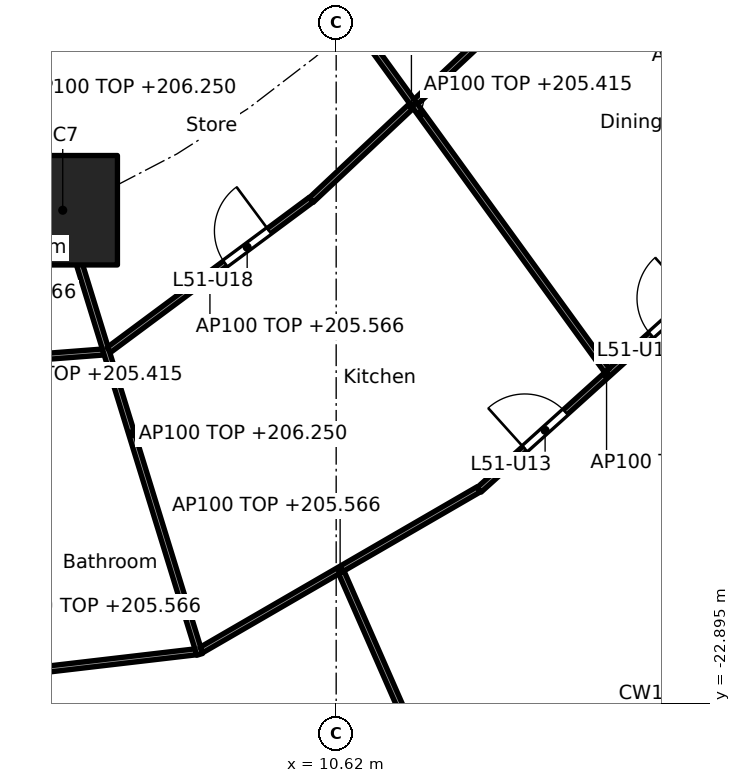
"""IFC4 building model, lengths in metres.
Left out: names, types, materials, properties, quantities, classifications, styles, units other than length and angle.
Written with IfcOpenShell. Run it as: python <this file> out.ifc"""

import sys

from ifc_helpers import new_model, si_unit, direction, frame, frame_2d, origin, origin_2d, place, context, subcontext, project, spatial, rectangle, extrude, element, fill, save


model = new_model("IFC4")
c1 = context("Model", 3, precision=1e-05, world=origin(), true_north=direction((0.0, 1.0)))
c2 = subcontext(c1, "Body", "Model", "MODEL_VIEW")
j1 = project(units=[si_unit("LENGTHUNIT", "METRE"), si_unit("PLANEANGLEUNIT", "RADIAN")], contexts=[c1])
p1 = place(None, origin())
s1 = spatial("IfcSite", under=j1, at=p1, CompositionType="ELEMENT")
p2 = place(p1, origin())
s2 = spatial("IfcBuilding", under=s1, at=p2, CompositionType="ELEMENT")
p3 = place(p2, frame((0.0, 0.0, 202.9)))
s3 = spatial("IfcBuildingStorey", under=s2, at=p3, CompositionType="ELEMENT", Elevation=202.9)
p4 = place(p3, frame((6.123, -14.782, 0.0), z_axis=(0.0, 0.0, 1.0), x_axis=(1.0, 0.0, 0.0)))
e1 = element("IfcColumn", 1, at=p4, inside=s3, PredefinedType="COLUMN", context=c2, shape_type="SweptSolid", body=[
    extrude(rectangle(XDim=1.8, YDim=1.8, at=origin_2d()), origin(), (0.0, 0.0, 1.0), 3.7),
])
p5 = place(p3, frame((5.275, -12.494, 0.0), z_axis=(0.0, 0.0, 1.0), x_axis=(0.707106781187, 0.707106781187, 0.0)))
e2 = element("IfcWall", 2, at=p5, inside=s3, PredefinedType="PARTITIONING", context=c2, shape_type="SweptSolid", body=[
    extrude(rectangle(XDim=10.409, YDim=0.2, at=frame_2d((5.205, 0.0))), origin(), (0.0, 0.0, 1.0), 3.35),
])
p6 = place(p3, frame((2.941, -22.671, 0.0), z_axis=(0.0, 0.0, 1.0), x_axis=(0.993245806382, 0.1160291692, 0.0)))
e3 = element("IfcWall", 3, at=p6, inside=s3, PredefinedType="PARTITIONING", context=c2, shape_type="SweptSolid", body=[
    extrude(rectangle(XDim=5.408, YDim=0.1, at=frame_2d((2.704, 0.0))), origin(), (0.0, 0.0, 1.0), 2.666),
])
p7 = place(p6, frame((0.902, 0.0, 0.0)))
e4 = element("IfcOpeningElement", 4, at=p7, cuts=e3, PredefinedType="OPENING", context=c2, shape_type="SweptSolid", body=[
    extrude(rectangle(XDim=0.9, YDim=2.1, at=frame_2d((0.45, 1.05))), frame((0.0, 0.06, 0.0), z_axis=(0.0, -1.0, 0.0), x_axis=(1.0, 0.0, 0.0)), (0.0, 0.0, 1.0), 0.12),
])
p8 = place(p3, frame((4.568, -17.284, 0.0), z_axis=(0.0, 0.0, 1.0), x_axis=(0.997076339393, 0.076411867029, 0.0)))
e5 = element("IfcWall", 5, at=p8, inside=s3, PredefinedType="PARTITIONING", context=c2, shape_type="SweptSolid", body=[
    extrude(rectangle(XDim=2.23, YDim=0.1, at=frame_2d((1.115, 0.0))), origin(), (0.0, 0.0, 1.0), 2.666),
])
p9 = place(p3, frame((5.243, -12.657, 0.0), z_axis=(0.0, 0.0, 1.0), x_axis=(0.382719158442, -0.923864733477, 0.0)))
e6 = element("IfcWall", 6, at=p9, inside=s3, PredefinedType="PARTITIONING", context=c2, shape_type="SweptSolid", body=[
    extrude(rectangle(XDim=2.25, YDim=0.1, at=frame_2d((1.125, 0.0))), origin(), (0.0, 0.0, 1.0), 3.35),
])
p10 = place(p3, frame((6.138, -14.83, 0.0), z_axis=(0.0, 0.0, 1.0), x_axis=(0.294822274121, -0.955552105687, 0.0)))
e7 = element("IfcWall", 7, at=p10, inside=s3, PredefinedType="PARTITIONING", context=c2, shape_type="SweptSolid", body=[
    extrude(rectangle(XDim=7.594, YDim=0.1, at=frame_2d((3.797, 0.0))), origin(), (0.0, 0.0, 1.0), 3.35),
])
p11 = place(p3, frame((6.881, -17.08, 0.0), z_axis=(0.0, 0.0, 1.0), x_axis=(0.802784956441, 0.596268659005, 0.0)))
e8 = element("IfcWall", 8, at=p11, inside=s3, PredefinedType="PARTITIONING", context=c2, shape_type="SweptSolid", body=[
    extrude(rectangle(XDim=4.142, YDim=0.1, at=frame_2d((2.071, 0.0))), origin(), (0.0, 0.0, 1.0), 2.666),
])
p12 = place(p11, frame((2.384, 0.0, 0.0)))
e9 = element("IfcOpeningElement", 9, at=p12, cuts=e8, PredefinedType="OPENING", context=c2, shape_type="SweptSolid", body=[
    extrude(rectangle(XDim=0.9, YDim=2.1, at=frame_2d((0.45, 1.05))), frame((0.0, 0.06, 0.0), z_axis=(0.0, -1.0, 0.0), x_axis=(1.0, 0.0, 0.0)), (0.0, 0.0, 1.0), 0.12),
])
p13 = place(p3, frame((8.405, -22.013, 0.0), z_axis=(0.0, 0.0, 1.0), x_axis=(0.865277177388, 0.501293732547, 0.0)))
e10 = element("IfcWall", 10, at=p13, inside=s3, PredefinedType="PARTITIONING", context=c2, shape_type="SweptSolid", body=[
    extrude(rectangle(XDim=5.27, YDim=0.1, at=frame_2d((2.635, 0.0))), origin(), (0.0, 0.0, 1.0), 2.666),
])
p14 = place(p3, frame((10.705, -20.738, 0.0), z_axis=(0.0, 0.0, 1.0), x_axis=(0.401740633891, -0.915753494714, 0.0)))
e11 = element("IfcWall", 11, at=p14, inside=s3, PredefinedType="PARTITIONING", context=c2, shape_type="SweptSolid", body=[
    extrude(rectangle(XDim=6.445, YDim=0.1, at=frame_2d((3.223, 0.0))), origin(), (0.0, 0.0, 1.0), 2.747),
])
p15 = place(p14, frame((2.773, 0.0, 0.0)))
e12 = element("IfcOpeningElement", 12, at=p15, cuts=e11, PredefinedType="OPENING", context=c2, shape_type="SweptSolid", body=[
    extrude(rectangle(XDim=0.9, YDim=2.1, at=frame_2d((0.45, 1.05))), frame((0.0, 0.06, 0.0), z_axis=(0.0, -1.0, 0.0), x_axis=(1.0, 0.0, 0.0)), (0.0, 0.0, 1.0), 0.12),
])
p16 = place(p3, frame((10.21, -14.614, 0.0), z_axis=(0.0, 0.0, 1.0), x_axis=(0.728883199496, 0.684638066055, 0.0)))
e13 = element("IfcWall", 13, at=p16, inside=s3, PredefinedType="PARTITIONING", context=c2, shape_type="SweptSolid", body=[
    extrude(rectangle(XDim=4.519, YDim=0.1, at=frame_2d((2.26, 0.0))), origin(), (0.0, 0.0, 1.0), 2.666),
])
p17 = place(p3, frame((12.971, -19.38, 0.0), z_axis=(0.0, 0.0, 1.0), x_axis=(0.742768881471, 0.669547898748, 0.0)))
e14 = element("IfcWall", 14, at=p17, inside=s3, PredefinedType="PARTITIONING", context=c2, shape_type="SweptSolid", body=[
    extrude(rectangle(XDim=5.642, YDim=0.1, at=frame_2d((2.821, 0.0))), origin(), (0.0, 0.0, 1.0), 2.666),
])
p18 = place(p17, frame((1.01, 0.0, 0.0)))
e15 = element("IfcOpeningElement", 15, at=p18, cuts=e14, PredefinedType="OPENING", context=c2, shape_type="SweptSolid", body=[
    extrude(rectangle(XDim=0.9, YDim=2.1, at=frame_2d((0.45, 1.05))), frame((0.0, 0.06, 0.0), z_axis=(0.0, -1.0, 0.0), x_axis=(1.0, 0.0, 0.0)), (0.0, 0.0, 1.0), 0.12),
])
p19 = place(p17, frame((3.806, 0.0, 0.0)))
e16 = element("IfcOpeningElement", 16, at=p19, cuts=e14, PredefinedType="OPENING", context=c2, shape_type="SweptSolid", body=[
    extrude(rectangle(XDim=0.9, YDim=2.1, at=frame_2d((0.45, 1.05))), frame((0.0, 0.06, 0.0), z_axis=(0.0, -1.0, 0.0), x_axis=(1.0, 0.0, 0.0)), (0.0, 0.0, 1.0), 0.12),
])
p20 = place(p3, frame((8.943, -8.966, 0.0), z_axis=(0.0, 0.0, 1.0), x_axis=(0.587181355751, -0.809455406714, 0.0)))
e17 = element("IfcWall", 17, at=p20, inside=s3, PredefinedType="PARTITIONING", context=c2, shape_type="SweptSolid", body=[
    extrude(rectangle(XDim=10.441, YDim=0.1, at=frame_2d((5.221, 0.0))), origin(), (0.0, 0.0, 1.0), 2.515),
])
p21 = place(p18, origin())
e18 = element("IfcDoor", 18, at=p21, inside=s3, OperationType="SINGLE_SWING_LEFT", PredefinedType="DOOR", context=c2, shape_type="SweptSolid", body=[
    extrude(rectangle(XDim=0.9, YDim=2.1, at=frame_2d((0.45, 1.05))), frame((0.0, 0.025, 0.0), z_axis=(0.0, -1.0, 0.0), x_axis=(1.0, 0.0, 0.0)), (0.0, 0.0, 1.0), 0.05),
])
fill(e15, e18)
p22 = place(p19, origin())
e19 = element("IfcDoor", 19, at=p22, inside=s3, OperationType="SINGLE_SWING_RIGHT", PredefinedType="DOOR", context=c2, shape_type="SweptSolid", body=[
    extrude(rectangle(XDim=0.9, YDim=2.1, at=frame_2d((0.45, 1.05))), frame((0.0, 0.025, 0.0), z_axis=(0.0, -1.0, 0.0), x_axis=(1.0, 0.0, 0.0)), (0.0, 0.0, 1.0), 0.05),
])
fill(e16, e19)
p23 = place(p12, origin())
e20 = element("IfcDoor", 20, at=p23, inside=s3, OperationType="SINGLE_SWING_RIGHT", PredefinedType="DOOR", context=c2, shape_type="SweptSolid", body=[
    extrude(rectangle(XDim=0.9, YDim=2.1, at=frame_2d((0.45, 1.05))), frame((0.0, 0.025, 0.0), z_axis=(0.0, -1.0, 0.0), x_axis=(1.0, 0.0, 0.0)), (0.0, 0.0, 1.0), 0.05),
])
fill(e9, e20)
save(model, sys.argv[1])
